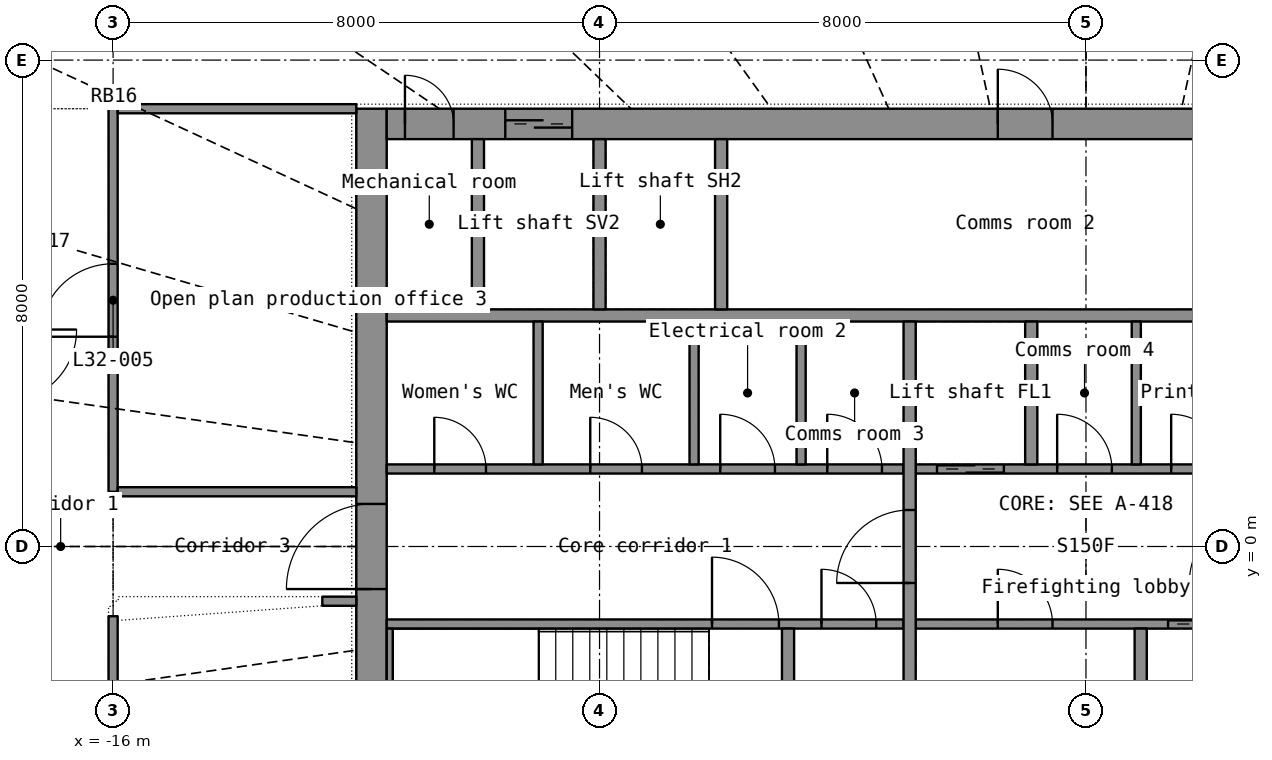
"""IFC4 building model, lengths in metres.
Left out: names, types, materials, properties, quantities, classifications, styles, units other than length and angle.
Written with IfcOpenShell. Run it as: python <this file> out.ifc"""

import sys

from ifc_helpers import new_model, si_unit, direction, frame, frame_2d, origin, place, context, subcontext, project, spatial, rectangle, extrude, element, fill, save


model = new_model("IFC4")
c1 = context("Model", 3, precision=1e-05, world=origin(), true_north=direction((0.0, 1.0)))
c2 = subcontext(c1, "Body", "Model", "MODEL_VIEW")
j1 = project(units=[si_unit("LENGTHUNIT", "METRE"), si_unit("PLANEANGLEUNIT", "RADIAN")], contexts=[c1])
p1 = place(None, origin())
s1 = spatial("IfcSite", under=j1, at=p1, CompositionType="ELEMENT")
p2 = place(p1, origin())
s2 = spatial("IfcBuilding", under=s1, at=p2, CompositionType="ELEMENT")
p3 = place(p2, frame((0.0, 0.0, 134.1)))
s3 = spatial("IfcBuildingStorey", under=s2, at=p3, CompositionType="ELEMENT", Elevation=134.1)
p4 = place(p3, frame((-11.75, -7.2, 0.0), z_axis=(0.0, 0.0, 1.0), x_axis=(0.0, 1.0, 0.0)))
e1 = element("IfcWall", 1, at=p4, inside=s3, PredefinedType="SHEAR", context=c2, shape_type="SweptSolid", body=[
    extrude(rectangle(XDim=14.4, YDim=0.5, at=frame_2d((7.2, 0.0))), origin(), (0.0, 0.0, 1.0), 3.3),
])
p5 = place(p4, frame((6.5, 0.0, 0.0)))
e2 = element("IfcOpeningElement", 2, at=p5, cuts=e1, PredefinedType="OPENING", context=c2, shape_type="SweptSolid", body=[
    extrude(rectangle(XDim=1.4, YDim=2.2, at=frame_2d((0.7, 1.1))), frame((0.0, 0.26, 0.0), z_axis=(0.0, -1.0, 0.0), x_axis=(1.0, 0.0, 0.0)), (0.0, 0.0, 1.0), 0.52),
])
p6 = place(p3, frame((-11.5, 6.95, 0.0), z_axis=(0.0, 0.0, 1.0), x_axis=(1.0, 0.0, 0.0)))
e3 = element("IfcWall", 3, at=p6, inside=s3, PredefinedType="SHEAR", context=c2, shape_type="SweptSolid", body=[
    extrude(rectangle(XDim=23.0, YDim=0.5, at=frame_2d((11.5, 0.0))), origin(), (0.0, 0.0, 1.0), 3.3),
])
p7 = place(p6, frame((1.95, 0.0, 0.0)))
e4 = element("IfcOpeningElement", 4, at=p7, cuts=e3, PredefinedType="OPENING", context=c2, shape_type="SweptSolid", body=[
    extrude(rectangle(XDim=1.1, YDim=2.2, at=frame_2d((0.55, 1.1))), frame((0.0, 0.26, 0.0), z_axis=(0.0, -1.0, 0.0), x_axis=(1.0, 0.0, 0.0)), (0.0, 0.0, 1.0), 0.52),
])
p8 = place(p6, frame((10.05, 0.0, 0.0)))
e5 = element("IfcOpeningElement", 5, at=p8, cuts=e3, PredefinedType="OPENING", context=c2, shape_type="SweptSolid", body=[
    extrude(rectangle(XDim=0.9, YDim=2.1, at=frame_2d((0.45, 1.05))), frame((0.0, 0.26, 0.0), z_axis=(0.0, -1.0, 0.0), x_axis=(1.0, 0.0, 0.0)), (0.0, 0.0, 1.0), 0.52),
])
p9 = place(p6, frame((18.05, 0.0, 0.0)))
e6 = element("IfcOpeningElement", 6, at=p9, cuts=e3, PredefinedType="OPENING", context=c2, shape_type="SweptSolid", body=[
    extrude(rectangle(XDim=0.9, YDim=2.1, at=frame_2d((0.45, 1.05))), frame((0.0, 0.26, 0.0), z_axis=(0.0, -1.0, 0.0), x_axis=(1.0, 0.0, 0.0)), (0.0, 0.0, 1.0), 0.52),
])
p10 = place(p6, frame((0.3, 0.0, 0.0)))
e7 = element("IfcOpeningElement", 7, at=p10, cuts=e3, PredefinedType="OPENING", context=c2, shape_type="SweptSolid", body=[
    extrude(rectangle(XDim=0.8, YDim=2.05, at=frame_2d((0.4, 1.025))), frame((0.0, 0.26, 0.0), z_axis=(0.0, -1.0, 0.0), x_axis=(1.0, 0.0, 0.0)), (0.0, 0.0, 1.0), 0.52),
])
p11 = place(p6, frame((21.9, 0.0, 0.0)))
e8 = element("IfcOpeningElement", 8, at=p11, cuts=e3, PredefinedType="OPENING", context=c2, shape_type="SweptSolid", body=[
    extrude(rectangle(XDim=0.8, YDim=2.05, at=frame_2d((0.4, 1.025))), frame((0.0, 0.26, 0.0), z_axis=(0.0, -1.0, 0.0), x_axis=(1.0, 0.0, 0.0)), (0.0, 0.0, 1.0), 0.52),
])
p12 = place(p3, frame((-11.5, 3.8, 0.0), z_axis=(0.0, 0.0, 1.0), x_axis=(1.0, 0.0, 0.0)))
e9 = element("IfcWall", 9, at=p12, inside=s3, PredefinedType="SHEAR", context=c2, shape_type="SweptSolid", body=[
    extrude(rectangle(XDim=23.0, YDim=0.2, at=frame_2d((11.5, 0.0))), origin(), (0.0, 0.0, 1.0), 3.3),
])
for number, where, z_axis, x_axis in (
    (10, (-10.0, 3.9, 0.0), (0.0, 0.0, 1.0), (0.0, 1.0, 0.0)),
    (11, (-8.0, 3.9, 0.0), (0.0, 0.0, 1.0), (0.0, 1.0, 0.0)),
    (12, (-6.0, 3.9, 0.0), (0.0, 0.0, 1.0), (0.0, 1.0, 0.0)),
):
    element("IfcWall", number, at=place(p3, frame(where, z_axis=z_axis, x_axis=x_axis)), inside=s3, PredefinedType="SHEAR", context=c2, shape_type="SweptSolid", body=[
        extrude(rectangle(XDim=2.8, YDim=0.2, at=frame_2d((1.4, 0.0))), origin(), (0.0, 0.0, 1.0), 3.3),
    ])
p13 = place(p3, frame((-11.5, -1.275, 0.0), z_axis=(0.0, 0.0, 1.0), x_axis=(1.0, 0.0, 0.0)))
e13 = element("IfcWall", 13, at=p13, inside=s3, PredefinedType="SHEAR", context=c2, shape_type="SweptSolid", body=[
    extrude(rectangle(XDim=8.5, YDim=0.15, at=frame_2d((4.25, 0.0))), origin(), (0.0, 0.0, 1.0), 3.3),
])
p14 = place(p13, frame((5.35, 0.0, 0.0)))
e14 = element("IfcOpeningElement", 14, at=p14, cuts=e13, PredefinedType="OPENING", context=c2, shape_type="SweptSolid", body=[
    extrude(rectangle(XDim=1.1, YDim=2.15, at=frame_2d((0.55, 1.075))), frame((0.0, 0.085, 0.0), z_axis=(0.0, -1.0, 0.0), x_axis=(1.0, 0.0, 0.0)), (0.0, 0.0, 1.0), 0.17),
])
p15 = place(p13, frame((7.15, 0.0, 0.0)))
e15 = element("IfcOpeningElement", 15, at=p15, cuts=e13, PredefinedType="OPENING", context=c2, shape_type="SweptSolid", body=[
    extrude(rectangle(XDim=0.9, YDim=2.1, at=frame_2d((0.45, 1.05))), frame((0.0, 0.085, 0.0), z_axis=(0.0, -1.0, 0.0), x_axis=(1.0, 0.0, 0.0)), (0.0, 0.0, 1.0), 0.17),
])
p16 = place(p3, frame((-2.8, -1.275, 0.0), z_axis=(0.0, 0.0, 1.0), x_axis=(1.0, 0.0, 0.0)))
e16 = element("IfcWall", 16, at=p16, inside=s3, PredefinedType="SHEAR", context=c2, shape_type="SweptSolid", body=[
    extrude(rectangle(XDim=5.6, YDim=0.15, at=frame_2d((2.8, 0.0))), origin(), (0.0, 0.0, 1.0), 3.3),
])
p17 = place(p16, frame((4.15, 0.0, 0.0)))
e17 = element("IfcOpeningElement", 17, at=p17, cuts=e16, PredefinedType="OPENING", context=c2, shape_type="SweptSolid", body=[
    extrude(rectangle(XDim=1.1, YDim=2.2, at=frame_2d((0.55, 1.1))), frame((0.0, 0.085, 0.0), z_axis=(0.0, -1.0, 0.0), x_axis=(1.0, 0.0, 0.0)), (0.0, 0.0, 1.0), 0.17),
])
p18 = place(p16, frame((1.35, 0.0, 0.0)))
e18 = element("IfcOpeningElement", 18, at=p18, cuts=e16, PredefinedType="OPENING", context=c2, shape_type="SweptSolid", body=[
    extrude(rectangle(XDim=0.9, YDim=2.1, at=frame_2d((0.45, 1.05))), frame((0.0, 0.085, 0.0), z_axis=(0.0, -1.0, 0.0), x_axis=(1.0, 0.0, 0.0)), (0.0, 0.0, 1.0), 0.17),
])
p19 = place(p3, frame((-11.5, 1.275, 0.0), z_axis=(0.0, 0.0, 1.0), x_axis=(1.0, 0.0, 0.0)))
e19 = element("IfcWall", 19, at=p19, inside=s3, PredefinedType="PARTITIONING", context=c2, shape_type="SweptSolid", body=[
    extrude(rectangle(XDim=8.5, YDim=0.15, at=frame_2d((4.25, 0.0))), origin(), (0.0, 0.0, 1.0), 3.3),
])
p20 = place(p19, frame((0.782, 0.0, 0.0)))
e20 = element("IfcOpeningElement", 20, at=p20, cuts=e19, PredefinedType="OPENING", context=c2, shape_type="SweptSolid", body=[
    extrude(rectangle(XDim=0.85, YDim=2.1, at=frame_2d((0.425, 1.05))), frame((0.0, 0.085, 0.0), z_axis=(0.0, -1.0, 0.0), x_axis=(1.0, 0.0, 0.0)), (0.0, 0.0, 1.0), 0.17),
])
p21 = place(p19, frame((3.347, 0.0, 0.0)))
e21 = element("IfcOpeningElement", 21, at=p21, cuts=e19, PredefinedType="OPENING", context=c2, shape_type="SweptSolid", body=[
    extrude(rectangle(XDim=0.85, YDim=2.1, at=frame_2d((0.425, 1.05))), frame((0.0, 0.085, 0.0), z_axis=(0.0, -1.0, 0.0), x_axis=(1.0, 0.0, 0.0)), (0.0, 0.0, 1.0), 0.17),
])
p22 = place(p19, frame((5.485, 0.0, 0.0)))
e22 = element("IfcOpeningElement", 22, at=p22, cuts=e19, PredefinedType="OPENING", context=c2, shape_type="SweptSolid", body=[
    extrude(rectangle(XDim=0.9, YDim=2.1, at=frame_2d((0.45, 1.05))), frame((0.0, 0.085, 0.0), z_axis=(0.0, -1.0, 0.0), x_axis=(1.0, 0.0, 0.0)), (0.0, 0.0, 1.0), 0.17),
])
p23 = place(p19, frame((7.245, 0.0, 0.0)))
e23 = element("IfcOpeningElement", 23, at=p23, cuts=e19, PredefinedType="OPENING", context=c2, shape_type="SweptSolid", body=[
    extrude(rectangle(XDim=0.9, YDim=2.1, at=frame_2d((0.45, 1.05))), frame((0.0, 0.085, 0.0), z_axis=(0.0, -1.0, 0.0), x_axis=(1.0, 0.0, 0.0)), (0.0, 0.0, 1.0), 0.17),
])
p24 = place(p3, frame((-2.8, 1.275, 0.0), z_axis=(0.0, 0.0, 1.0), x_axis=(1.0, 0.0, 0.0)))
e24 = element("IfcWall", 24, at=p24, inside=s3, PredefinedType="SHEAR", context=c2, shape_type="SweptSolid", body=[
    extrude(rectangle(XDim=5.6, YDim=0.15, at=frame_2d((2.8, 0.0))), origin(), (0.0, 0.0, 1.0), 3.3),
])
p25 = place(p24, frame((0.35, 0.0, 0.0)))
e25 = element("IfcOpeningElement", 25, at=p25, cuts=e24, PredefinedType="OPENING", context=c2, shape_type="SweptSolid", body=[
    extrude(rectangle(XDim=1.1, YDim=2.2, at=frame_2d((0.55, 1.1))), frame((0.0, 0.085, 0.0), z_axis=(0.0, -1.0, 0.0), x_axis=(1.0, 0.0, 0.0)), (0.0, 0.0, 1.0), 0.17),
])
p26 = place(p24, frame((2.326, 0.0, 0.0)))
e26 = element("IfcOpeningElement", 26, at=p26, cuts=e24, PredefinedType="OPENING", context=c2, shape_type="SweptSolid", body=[
    extrude(rectangle(XDim=0.9, YDim=2.1, at=frame_2d((0.45, 1.05))), frame((0.0, 0.085, 0.0), z_axis=(0.0, -1.0, 0.0), x_axis=(1.0, 0.0, 0.0)), (0.0, 0.0, 1.0), 0.17),
])
p27 = place(p24, frame((4.201, 0.0, 0.0)))
e27 = element("IfcOpeningElement", 27, at=p27, cuts=e24, PredefinedType="OPENING", context=c2, shape_type="SweptSolid", body=[
    extrude(rectangle(XDim=0.9, YDim=2.1, at=frame_2d((0.45, 1.05))), frame((0.0, 0.085, 0.0), z_axis=(0.0, -1.0, 0.0), x_axis=(1.0, 0.0, 0.0)), (0.0, 0.0, 1.0), 0.17),
])
p28 = place(p3, frame((-2.9, -3.7, 0.0), z_axis=(0.0, 0.0, 1.0), x_axis=(0.0, 1.0, 0.0)))
e28 = element("IfcWall", 28, at=p28, inside=s3, PredefinedType="SHEAR", context=c2, shape_type="SweptSolid", body=[
    extrude(rectangle(XDim=7.4, YDim=0.2, at=frame_2d((3.7, 0.0))), origin(), (0.0, 0.0, 1.0), 3.3),
])
p29 = place(p28, frame((3.1, 0.0, 0.0)))
e29 = element("IfcOpeningElement", 29, at=p29, cuts=e28, PredefinedType="OPENING", context=c2, shape_type="SweptSolid", body=[
    extrude(rectangle(XDim=1.2, YDim=2.2, at=frame_2d((0.6, 1.1))), frame((0.0, 0.11, 0.0), z_axis=(0.0, -1.0, 0.0), x_axis=(1.0, 0.0, 0.0)), (0.0, 0.0, 1.0), 0.22),
])
for number, where, z_axis, x_axis in (
    (30, (-0.9, 1.35, 0.0), (0.0, 0.0, 1.0), (0.0, 1.0, 0.0)),
    (31, (0.9, -3.7, 0.0), (0.0, 0.0, 1.0), (0.0, 1.0, 0.0)),
):
    element("IfcWall", number, at=place(p3, frame(where, z_axis=z_axis, x_axis=x_axis)), inside=s3, PredefinedType="SHEAR", context=c2, shape_type="SweptSolid", body=[
        extrude(rectangle(XDim=2.35, YDim=0.2, at=frame_2d((1.175, 0.0))), origin(), (0.0, 0.0, 1.0), 3.3),
    ])
p30 = place(p3, frame((-11.45, -3.7, 0.0), z_axis=(0.0, 0.0, 1.0), x_axis=(0.0, 1.0, 0.0)))
e32 = element("IfcWall", 32, at=p30, inside=s3, PredefinedType="SHEAR", context=c2, shape_type="SweptSolid", body=[
    extrude(rectangle(XDim=2.35, YDim=0.1, at=frame_2d((1.175, 0.0))), origin(), (0.0, 0.0, 1.0), 3.3),
])
p31 = place(p3, frame((-4.9, -3.7, 0.0), z_axis=(0.0, 0.0, 1.0), x_axis=(0.0, 1.0, 0.0)))
e33 = element("IfcWall", 33, at=p31, inside=s3, PredefinedType="SHEAR", context=c2, shape_type="SweptSolid", body=[
    extrude(rectangle(XDim=2.35, YDim=0.2, at=frame_2d((1.175, 0.0))), origin(), (0.0, 0.0, 1.0), 3.3),
])
for number, where, z_axis, x_axis in (
    (34, (-9.01, 1.35, 0.0), (0.0, 0.0, 1.0), (0.0, 1.0, 0.0)),
    (35, (-6.445, 1.35, 0.0), (0.0, 0.0, 1.0), (0.0, 1.0, 0.0)),
    (36, (-4.685, 1.35, 0.0), (0.0, 0.0, 1.0), (0.0, 1.0, 0.0)),
    (37, (0.827, 1.35, 0.0), (0.0, 0.0, 1.0), (0.0, 1.0, 0.0)),
):
    element("IfcWall", number, at=place(p3, frame(where, z_axis=z_axis, x_axis=x_axis)), inside=s3, PredefinedType="PARTITIONING", context=c2, shape_type="SweptSolid", body=[
        extrude(rectangle(XDim=2.35, YDim=0.15, at=frame_2d((1.175, 0.0))), origin(), (0.0, 0.0, 1.0), 3.3),
    ])
p32 = place(p3, frame((-16.0, 0.9, 0.0), z_axis=(0.0, 0.0, 1.0), x_axis=(0.0, 1.0, 0.0)))
e38 = element("IfcWall", 38, at=p32, inside=s3, PredefinedType="PARTITIONING", context=c2, shape_type="SweptSolid", body=[
    extrude(rectangle(XDim=6.3, YDim=0.15, at=frame_2d((3.15, 0.0))), origin(), (0.0, 0.0, 1.0), 2.4),
])
p33 = place(p32, frame((2.55, 0.0, 0.0)))
e39 = element("IfcOpeningElement", 39, at=p33, cuts=e38, PredefinedType="OPENING", context=c2, shape_type="SweptSolid", body=[
    extrude(rectangle(XDim=1.2, YDim=2.2, at=frame_2d((0.6, 1.1))), frame((0.0, 0.085, 0.0), z_axis=(0.0, -1.0, 0.0), x_axis=(1.0, 0.0, 0.0)), (0.0, 0.0, 1.0), 0.17),
])
p34 = place(p3, frame((-16.0, -6.111, 0.0), z_axis=(0.0, 0.0, 1.0), x_axis=(0.0, 1.0, 0.0)))
e40 = element("IfcWall", 40, at=p34, inside=s3, PredefinedType="PARTITIONING", context=c2, shape_type="SweptSolid", body=[
    extrude(rectangle(XDim=4.965, YDim=0.15, at=frame_2d((2.482, 0.0))), origin(), (0.0, 0.0, 1.0), 2.4),
])
p35 = place(p34, frame((1.982, 0.0, 0.0)))
e41 = element("IfcOpeningElement", 41, at=p35, cuts=e40, PredefinedType="OPENING", context=c2, shape_type="SweptSolid", body=[
    extrude(rectangle(XDim=1.0, YDim=2.2, at=frame_2d((0.5, 1.1))), frame((0.0, 0.085, 0.0), z_axis=(0.0, -1.0, 0.0), x_axis=(1.0, 0.0, 0.0)), (0.0, 0.0, 1.0), 0.17),
])
for number, where, z_axis, x_axis in (
    (42, (-15.923, 7.2, 0.0), (0.0, 0.0, 1.0), (1.0, 0.0, 0.0)),
    (43, (-12.0, 0.9, 0.0), (0.0, 0.0, 1.0), (-1.0, 0.0, 0.0)),
):
    element("IfcWall", number, at=place(p3, frame(where, z_axis=z_axis, x_axis=x_axis)), inside=s3, PredefinedType="PARTITIONING", context=c2, shape_type="SweptSolid", body=[
        extrude(rectangle(XDim=3.923, YDim=0.15, at=frame_2d((1.961, 0.0))), origin(), (0.0, 0.0, 1.0), 2.4),
    ])
p36 = place(p3, frame((-12.559, -0.9, 0.0), z_axis=(0.0, 0.0, 1.0), x_axis=(1.0, 0.0, 0.0)))
e44 = element("IfcWall", 44, at=p36, inside=s3, PredefinedType="PARTITIONING", context=c2, shape_type="SweptSolid", body=[
    extrude(rectangle(XDim=0.559, YDim=0.15, at=frame_2d((0.279, 0.0))), origin(), (0.0, 0.0, 1.0), 2.4),
])
p37 = place(p7, origin())
e45 = element("IfcDoor", 45, at=p37, inside=s3, OperationType="DOUBLE_DOOR_SLIDING", PredefinedType="DOOR", context=c2, shape_type="SweptSolid", body=[
    extrude(rectangle(XDim=1.1, YDim=2.2, at=frame_2d((0.55, 1.1))), frame((0.0, 0.025, 0.0), z_axis=(0.0, -1.0, 0.0), x_axis=(1.0, 0.0, 0.0)), (0.0, 0.0, 1.0), 0.05),
])
fill(e4, e45)
p38 = place(p8, origin())
e46 = element("IfcDoor", 46, at=p38, inside=s3, OperationType="SINGLE_SWING_LEFT", PredefinedType="DOOR", context=c2, shape_type="SweptSolid", body=[
    extrude(rectangle(XDim=0.9, YDim=2.1, at=frame_2d((0.45, 1.05))), frame((0.0, 0.025, 0.0), z_axis=(0.0, -1.0, 0.0), x_axis=(1.0, 0.0, 0.0)), (0.0, 0.0, 1.0), 0.05),
])
fill(e5, e46)
p39 = place(p10, origin())
e47 = element("IfcDoor", 47, at=p39, inside=s3, OperationType="SINGLE_SWING_LEFT", PredefinedType="DOOR", context=c2, shape_type="SweptSolid", body=[
    extrude(rectangle(XDim=0.8, YDim=2.05, at=frame_2d((0.4, 1.025))), frame((0.0, 0.025, 0.0), z_axis=(0.0, -1.0, 0.0), x_axis=(1.0, 0.0, 0.0)), (0.0, 0.0, 1.0), 0.05),
])
fill(e7, e47)
p40 = place(p5, origin())
e48 = element("IfcDoor", 48, at=p40, inside=s3, OperationType="DOUBLE_DOOR_SINGLE_SWING", PredefinedType="DOOR", context=c2, shape_type="SweptSolid", body=[
    extrude(rectangle(XDim=1.4, YDim=2.2, at=frame_2d((0.7, 1.1))), frame((0.0, 0.025, 0.0), z_axis=(0.0, -1.0, 0.0), x_axis=(1.0, 0.0, 0.0)), (0.0, 0.0, 1.0), 0.05),
])
fill(e2, e48)
p41 = place(p29, origin())
e49 = element("IfcDoor", 49, at=p41, inside=s3, OperationType="SINGLE_SWING_LEFT", PredefinedType="DOOR", context=c2, shape_type="SweptSolid", body=[
    extrude(rectangle(XDim=1.2, YDim=2.2, at=frame_2d((0.6, 1.1))), frame((0.0, 0.025, 0.0), z_axis=(0.0, -1.0, 0.0), x_axis=(1.0, 0.0, 0.0)), (0.0, 0.0, 1.0), 0.05),
])
fill(e29, e49)
p42 = place(p25, origin())
e50 = element("IfcDoor", 50, at=p42, inside=s3, OperationType="DOUBLE_DOOR_SLIDING", PredefinedType="DOOR", context=c2, shape_type="SweptSolid", body=[
    extrude(rectangle(XDim=1.1, YDim=2.2, at=frame_2d((0.55, 1.1))), frame((0.0, 0.025, 0.0), z_axis=(0.0, -1.0, 0.0), x_axis=(1.0, 0.0, 0.0)), (0.0, 0.0, 1.0), 0.05),
])
fill(e25, e50)
p43 = place(p17, origin())
e51 = element("IfcDoor", 51, at=p43, inside=s3, OperationType="DOUBLE_DOOR_SLIDING", PredefinedType="DOOR", context=c2, shape_type="SweptSolid", body=[
    extrude(rectangle(XDim=1.1, YDim=2.2, at=frame_2d((0.55, 1.1))), frame((0.0, 0.025, 0.0), z_axis=(0.0, -1.0, 0.0), x_axis=(1.0, 0.0, 0.0)), (0.0, 0.0, 1.0), 0.05),
])
fill(e17, e51)
p44 = place(p14, origin())
e52 = element("IfcDoor", 52, at=p44, inside=s3, OperationType="SINGLE_SWING_LEFT", PredefinedType="DOOR", context=c2, shape_type="SweptSolid", body=[
    extrude(rectangle(XDim=1.1, YDim=2.15, at=frame_2d((0.55, 1.075))), frame((0.0, 0.025, 0.0), z_axis=(0.0, -1.0, 0.0), x_axis=(1.0, 0.0, 0.0)), (0.0, 0.0, 1.0), 0.05),
])
fill(e14, e52)
p45 = place(p20, origin())
e53 = element("IfcDoor", 53, at=p45, inside=s3, OperationType="SINGLE_SWING_LEFT", PredefinedType="DOOR", context=c2, shape_type="SweptSolid", body=[
    extrude(rectangle(XDim=0.85, YDim=2.1, at=frame_2d((0.425, 1.05))), frame((0.0, 0.025, 0.0), z_axis=(0.0, -1.0, 0.0), x_axis=(1.0, 0.0, 0.0)), (0.0, 0.0, 1.0), 0.05),
])
fill(e20, e53)
p46 = place(p21, origin())
e54 = element("IfcDoor", 54, at=p46, inside=s3, OperationType="SINGLE_SWING_LEFT", PredefinedType="DOOR", context=c2, shape_type="SweptSolid", body=[
    extrude(rectangle(XDim=0.85, YDim=2.1, at=frame_2d((0.425, 1.05))), frame((0.0, 0.025, 0.0), z_axis=(0.0, -1.0, 0.0), x_axis=(1.0, 0.0, 0.0)), (0.0, 0.0, 1.0), 0.05),
])
fill(e21, e54)
p47 = place(p22, origin())
e55 = element("IfcDoor", 55, at=p47, inside=s3, OperationType="SINGLE_SWING_LEFT", PredefinedType="DOOR", context=c2, shape_type="SweptSolid", body=[
    extrude(rectangle(XDim=0.9, YDim=2.1, at=frame_2d((0.45, 1.05))), frame((0.0, 0.025, 0.0), z_axis=(0.0, -1.0, 0.0), x_axis=(1.0, 0.0, 0.0)), (0.0, 0.0, 1.0), 0.05),
])
fill(e22, e55)
p48 = place(p23, origin())
e56 = element("IfcDoor", 56, at=p48, inside=s3, OperationType="SINGLE_SWING_LEFT", PredefinedType="DOOR", context=c2, shape_type="SweptSolid", body=[
    extrude(rectangle(XDim=0.9, YDim=2.1, at=frame_2d((0.45, 1.05))), frame((0.0, 0.025, 0.0), z_axis=(0.0, -1.0, 0.0), x_axis=(1.0, 0.0, 0.0)), (0.0, 0.0, 1.0), 0.05),
])
fill(e23, e56)
p49 = place(p26, origin())
e57 = element("IfcDoor", 57, at=p49, inside=s3, OperationType="SINGLE_SWING_LEFT", PredefinedType="DOOR", context=c2, shape_type="SweptSolid", body=[
    extrude(rectangle(XDim=0.9, YDim=2.1, at=frame_2d((0.45, 1.05))), frame((0.0, 0.025, 0.0), z_axis=(0.0, -1.0, 0.0), x_axis=(1.0, 0.0, 0.0)), (0.0, 0.0, 1.0), 0.05),
])
fill(e26, e57)
p50 = place(p27, origin())
e58 = element("IfcDoor", 58, at=p50, inside=s3, OperationType="SINGLE_SWING_LEFT", PredefinedType="DOOR", context=c2, shape_type="SweptSolid", body=[
    extrude(rectangle(XDim=0.9, YDim=2.1, at=frame_2d((0.45, 1.05))), frame((0.0, 0.025, 0.0), z_axis=(0.0, -1.0, 0.0), x_axis=(1.0, 0.0, 0.0)), (0.0, 0.0, 1.0), 0.05),
])
fill(e27, e58)
p51 = place(p18, origin())
e59 = element("IfcDoor", 59, at=p51, inside=s3, OperationType="SINGLE_SWING_LEFT", PredefinedType="DOOR", context=c2, shape_type="SweptSolid", body=[
    extrude(rectangle(XDim=0.9, YDim=2.1, at=frame_2d((0.45, 1.05))), frame((0.0, 0.025, 0.0), z_axis=(0.0, -1.0, 0.0), x_axis=(1.0, 0.0, 0.0)), (0.0, 0.0, 1.0), 0.05),
])
fill(e18, e59)
p52 = place(p15, origin())
e60 = element("IfcDoor", 60, at=p52, inside=s3, OperationType="SINGLE_SWING_LEFT", PredefinedType="DOOR", context=c2, shape_type="SweptSolid", body=[
    extrude(rectangle(XDim=0.9, YDim=2.1, at=frame_2d((0.45, 1.05))), frame((0.0, 0.025, 0.0), z_axis=(0.0, -1.0, 0.0), x_axis=(1.0, 0.0, 0.0)), (0.0, 0.0, 1.0), 0.05),
])
fill(e15, e60)
p53 = place(p33, origin())
e61 = element("IfcDoor", 61, at=p53, inside=s3, OperationType="DOUBLE_DOOR_SINGLE_SWING", PredefinedType="DOOR", context=c2, shape_type="SweptSolid", body=[
    extrude(rectangle(XDim=1.2, YDim=2.2, at=frame_2d((0.6, 1.1))), frame((0.0, 0.025, 0.0), z_axis=(0.0, -1.0, 0.0), x_axis=(1.0, 0.0, 0.0)), (0.0, 0.0, 1.0), 0.05),
])
fill(e39, e61)
save(model, sys.argv[1])
